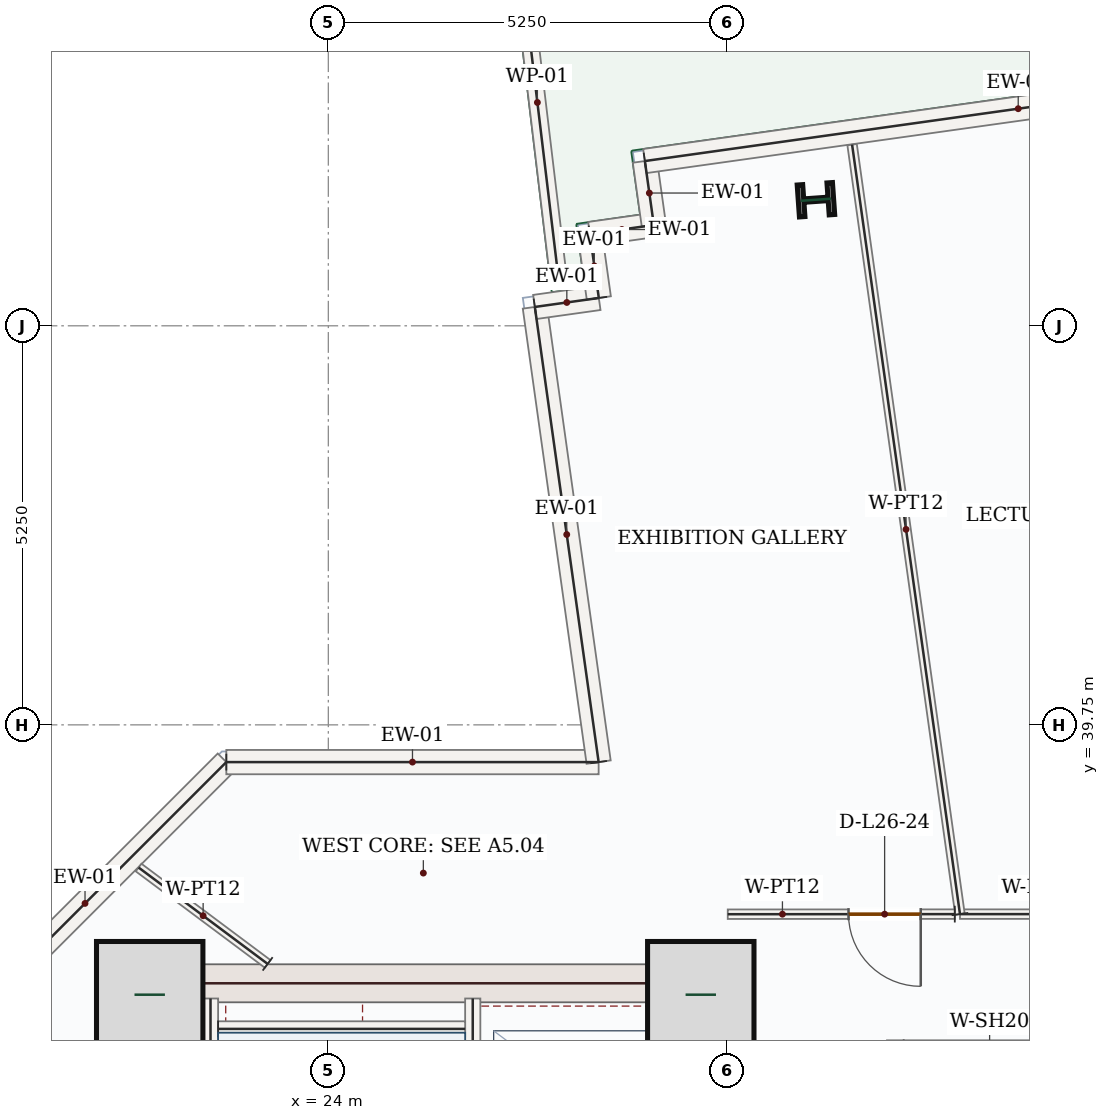
"""IFC4 building model, lengths in metres.
Left out: names, types, materials, properties, quantities, classifications, styles, units other than length and angle.
Written with IfcOpenShell. Run it as: python <this file> out.ifc"""

import sys

from ifc_helpers import new_model, si_unit, direction, frame, frame_2d, origin, origin_2d, place, context, subcontext, project, spatial, rectangle, i_section, extrude, source, transform, mapped, element, fill, save


model = new_model("IFC4")
c1 = context("Model", 3, precision=1e-05, world=origin(), true_north=direction((0.0, 1.0)))
c2 = subcontext(c1, "Body", "Model", "MODEL_VIEW")
j1 = project(units=[si_unit("LENGTHUNIT", "METRE"), si_unit("PLANEANGLEUNIT", "RADIAN")], contexts=[c1])
p1 = place(None, origin())
s1 = spatial("IfcSite", under=j1, at=p1, CompositionType="ELEMENT")
p2 = place(p1, origin())
s2 = spatial("IfcBuilding", under=s1, at=p2, CompositionType="ELEMENT")
p3 = place(p2, frame((0.0, 0.0, 117.3)))
s3 = spatial("IfcBuildingStorey", under=s2, at=p3, CompositionType="ELEMENT", Elevation=117.3)
m1 = source(origin(), c2, "Body", "SweptSolid", [
    extrude(rectangle(XDim=8.55, YDim=0.5, at=frame_2d((4.275, 0.0))), origin(), (0.0, 0.0, 1.0), 3.95),
])
p4 = place(p3, frame((21.5, 28.05, 0.0), z_axis=(0.0, 0.0, 1.0), x_axis=(0.0, 1.0, 0.0)))
e1 = element("IfcWall", 1, at=p4, inside=s3, PredefinedType="SHEAR", context=c2, shape_type="MappedRepresentation", body=[
    mapped(m1, transform((0.0, 0.0, 0.0), x_axis=(1.0, 0.0, 0.0), y_axis=(0.0, 1.0, 0.0), z_axis=(0.0, 0.0, 1.0), scale=1.0)),
])
p5 = place(p3, frame((29.0, 28.05, 0.0), z_axis=(0.0, 0.0, 1.0), x_axis=(0.0, 1.0, 0.0)))
e2 = element("IfcWall", 2, at=p5, inside=s3, PredefinedType="SHEAR", context=c2, shape_type="SweptSolid", body=[
    extrude(rectangle(XDim=8.55, YDim=0.5, at=frame_2d((4.275, 0.0))), origin(), (0.0, 0.0, 1.0), 3.95),
])
p6 = place(p5, frame((1.5, 0.0, 0.0)))
e3 = element("IfcOpeningElement", 3, at=p6, cuts=e2, PredefinedType="OPENING", context=c2, shape_type="SweptSolid", body=[
    extrude(rectangle(XDim=1.1, YDim=2.2, at=frame_2d((0.55, 1.1))), frame((0.0, 0.26, 0.0), z_axis=(0.0, -1.0, 0.0), x_axis=(1.0, 0.0, 0.0)), (0.0, 0.0, 1.0), 0.52),
])
m2 = source(origin(), c2, "Body", "SweptSolid", [
    extrude(rectangle(XDim=7.0, YDim=0.5, at=frame_2d((3.5, 0.0))), origin(), (0.0, 0.0, 1.0), 3.95),
])
p7 = place(p3, frame((21.75, 36.35, 0.0), z_axis=(0.0, 0.0, 1.0), x_axis=(1.0, 0.0, 0.0)))
e4 = element("IfcWall", 4, at=p7, inside=s3, PredefinedType="SHEAR", context=c2, shape_type="MappedRepresentation", body=[
    mapped(m2, transform((0.0, 0.0, 0.0), x_axis=(1.0, 0.0, 0.0), y_axis=(0.0, 1.0, 0.0), z_axis=(0.0, 0.0, 1.0), scale=1.0)),
])
m3 = source(origin(), c2, "Body", "SweptSolid", [
    extrude(rectangle(XDim=1.4, YDim=1.4, at=origin_2d()), origin(), (0.0, 0.0, 1.0), 4.2),
])
for number, where, z_axis, x_axis in (
    (5, (21.65, 36.2, 0.0), (0.0, 0.0, 1.0), (1.0, 0.0, 0.0)),
    (6, (28.9, 36.2, 0.0), (0.0, 0.0, 1.0), (1.0, 0.0, 0.0)),
):
    element("IfcColumn", number, at=place(p3, frame(where, z_axis=z_axis, x_axis=x_axis)), inside=s3, PredefinedType="COLUMN", context=c2, shape_type="MappedRepresentation", body=[
        mapped(m3, transform((0.0, 0.0, 0.0), x_axis=(1.0, 0.0, 0.0), y_axis=(0.0, 1.0, 0.0), z_axis=(0.0, 0.0, 1.0), scale=1.0)),
    ])
m4 = source(origin(), c2, "Body", "SweptSolid", [
    extrude(i_section(OverallWidth=0.421, OverallDepth=0.465, WebThickness=0.045, FlangeThickness=0.073, FilletRadius=0.018, at=origin_2d()), origin(), (0.0, 0.0, 1.0), 4.2),
])
p8 = place(p3, frame((30.415, 46.658, 0.0), z_axis=(0.0, 0.0, 1.0), x_axis=(-0.069756473744, 0.99756405026, 0.0)))
e7 = element("IfcColumn", 7, at=p8, inside=s3, PredefinedType="COLUMN", context=c2, shape_type="MappedRepresentation", body=[
    mapped(m4, transform((0.0, 0.0, 0.0), x_axis=(1.0, 0.0, 0.0), y_axis=(0.0, 1.0, 0.0), z_axis=(0.0, 0.0, 1.0), scale=1.0)),
])
m5 = source(origin(), c2, "Body", "SweptSolid", [
    extrude(rectangle(XDim=4.599, YDim=0.22, at=frame_2d((2.3, 0.0))), origin(), (0.0, 0.0, 1.0), 1.2),
])
p9 = place(p3, frame((27.024, 45.655, 0.0), z_axis=(0.0, 0.0, 1.0), x_axis=(-0.119113824052, 0.992880605571, 0.0)))
e8 = element("IfcWall", 8, at=p9, inside=s3, PredefinedType="PARAPET", context=c2, shape_type="MappedRepresentation", body=[
    mapped(m5, transform((0.0, 0.0, 0.0), x_axis=(1.0, 0.0, 0.0), y_axis=(0.0, 1.0, 0.0), z_axis=(0.0, 0.0, 1.0), scale=1.0)),
])
m6 = source(origin(), c2, "Body", "SweptSolid", [
    extrude(rectangle(XDim=5.258, YDim=0.32, at=frame_2d((2.629, 0.0))), origin(), (0.0, 0.0, 1.0), 3.95),
])
p10 = place(p3, frame((18.94, 35.542, 0.0), z_axis=(0.0, 0.0, 1.0), x_axis=(0.707106781187, 0.707106781187, 0.0)))
e9 = element("IfcWall", 9, at=p10, inside=s3, PredefinedType="SOLIDWALL", context=c2, shape_type="MappedRepresentation", body=[
    mapped(m6, transform((0.0, 0.0, 0.0), x_axis=(1.0, 0.0, 0.0), y_axis=(0.0, 1.0, 0.0), z_axis=(0.0, 0.0, 1.0), scale=1.0)),
])
m7 = source(origin(), c2, "Body", "SweptSolid", [
    extrude(rectangle(XDim=4.898, YDim=0.32, at=frame_2d((2.449, 0.0))), origin(), (0.0, 0.0, 1.0), 3.95),
])
p11 = place(p3, frame((22.658, 39.26, 0.0), z_axis=(0.0, 0.0, 1.0), x_axis=(1.0, 0.0, 0.0)))
e10 = element("IfcWall", 10, at=p11, inside=s3, PredefinedType="SOLIDWALL", context=c2, shape_type="MappedRepresentation", body=[
    mapped(m7, transform((0.0, 0.0, 0.0), x_axis=(1.0, 0.0, 0.0), y_axis=(0.0, 1.0, 0.0), z_axis=(0.0, 0.0, 1.0), scale=1.0)),
])
m8 = source(origin(), c2, "Body", "SweptSolid", [
    extrude(rectangle(XDim=6.046, YDim=0.32, at=frame_2d((3.023, 0.0))), origin(), (0.0, 0.0, 1.0), 3.95),
])
p12 = place(p3, frame((27.556, 39.26, 0.0), z_axis=(0.0, 0.0, 1.0), x_axis=(-0.138820507469, 0.990317558517, 0.0)))
e11 = element("IfcWall", 11, at=p12, inside=s3, PredefinedType="SOLIDWALL", context=c2, shape_type="MappedRepresentation", body=[
    mapped(m8, transform((0.0, 0.0, 0.0), x_axis=(1.0, 0.0, 0.0), y_axis=(0.0, 1.0, 0.0), z_axis=(0.0, 0.0, 1.0), scale=1.0)),
])
m9 = source(origin(), c2, "Body", "SweptSolid", [
    extrude(rectangle(XDim=0.85, YDim=0.32, at=frame_2d((0.425, 0.0))), origin(), (0.0, 0.0, 1.0), 3.95),
])
for number, where, z_axis, x_axis in (
    (12, (26.717, 45.248, 0.0), (0.0, 0.0, 1.0), (0.99, 0.139, 0.0)),
    (13, (27.559, 45.366, 0.0), (0.0, 0.0, 1.0), (-0.139, 0.99, 0.0)),
):
    element("IfcWall", number, at=place(p3, frame(where, z_axis=z_axis, x_axis=x_axis)), inside=s3, PredefinedType="SOLIDWALL", context=c2, shape_type="MappedRepresentation", body=[
        mapped(m9, transform((0.0, 0.0, 0.0), x_axis=(1.0, 0.0, 0.0), y_axis=(0.0, 1.0, 0.0), z_axis=(0.0, 0.0, 1.0), scale=1.0)),
    ])
m10 = source(origin(), c2, "Body", "SweptSolid", [
    extrude(rectangle(XDim=0.85, YDim=0.32, at=frame_2d((0.425, 0.0))), origin(), (0.0, 0.0, 1.0), 3.95),
])
p13 = place(p3, frame((27.441, 46.208, 0.0), z_axis=(0.0, 0.0, 1.0), x_axis=(0.990325171071, 0.138766190202, 0.0)))
e14 = element("IfcWall", 14, at=p13, inside=s3, PredefinedType="SOLIDWALL", context=c2, shape_type="MappedRepresentation", body=[
    mapped(m10, transform((0.0, 0.0, 0.0), x_axis=(1.0, 0.0, 0.0), y_axis=(0.0, 1.0, 0.0), z_axis=(0.0, 0.0, 1.0), scale=1.0)),
])
p14 = place(p3, frame((28.282, 46.326, 0.0), z_axis=(0.0, 0.0, 1.0), x_axis=(-0.138726719425, 0.990330700987, 0.0)))
e15 = element("IfcWall", 15, at=p14, inside=s3, PredefinedType="SOLIDWALL", context=c2, shape_type="MappedRepresentation", body=[
    mapped(m9, transform((0.0, 0.0, 0.0), x_axis=(1.0, 0.0, 0.0), y_axis=(0.0, 1.0, 0.0), z_axis=(0.0, 0.0, 1.0), scale=1.0)),
])
m11 = source(origin(), c2, "Body", "SweptSolid", [
    extrude(rectangle(XDim=9.92, YDim=0.32, at=frame_2d((4.96, 0.0))), origin(), (0.0, 0.0, 1.0), 3.95),
])
p15 = place(p3, frame((28.164, 47.167, 0.0), z_axis=(0.0, 0.0, 1.0), x_axis=(0.990316250135, 0.138829840876, 0.0)))
e16 = element("IfcWall", 16, at=p15, inside=s3, PredefinedType="SOLIDWALL", context=c2, shape_type="MappedRepresentation", body=[
    mapped(m11, transform((0.0, 0.0, 0.0), x_axis=(1.0, 0.0, 0.0), y_axis=(0.0, 1.0, 0.0), z_axis=(0.0, 0.0, 1.0), scale=1.0)),
])
m12 = source(origin(), c2, "Body", "SweptSolid", [
    extrude(rectangle(XDim=7.87, YDim=0.2, at=frame_2d((3.935, 0.0))), origin(), (0.0, 0.0, 1.0), 3.95),
])
p16 = place(p3, frame((22.45, 28.28, 0.0), z_axis=(0.0, 0.0, 1.0), x_axis=(0.0, 1.0, 0.0)))
e17 = element("IfcWall", 17, at=p16, inside=s3, PredefinedType="SOLIDWALL", context=c2, shape_type="MappedRepresentation", body=[
    mapped(m12, transform((0.0, 0.0, 0.0), x_axis=(1.0, 0.0, 0.0), y_axis=(0.0, 1.0, 0.0), z_axis=(0.0, 0.0, 1.0), scale=1.0)),
])
p17 = place(p3, frame((25.9, 28.15, 0.0), z_axis=(0.0, 0.0, 1.0), x_axis=(0.0, 1.0, 0.0)))
e18 = element("IfcWall", 18, at=p17, inside=s3, PredefinedType="SOLIDWALL", context=c2, shape_type="SweptSolid", body=[
    extrude(rectangle(XDim=8.0, YDim=0.2, at=frame_2d((4.0, 0.0))), origin(), (0.0, 0.0, 1.0), 3.95),
])
p18 = place(p17, frame((0.4, 0.0, 0.0)))
e19 = element("IfcOpeningElement", 19, at=p18, cuts=e18, PredefinedType="OPENING", context=c2, shape_type="SweptSolid", body=[
    extrude(rectangle(XDim=1.05, YDim=2.15, at=frame_2d((0.525, 1.075))), frame((0.0, 0.11, 0.0), z_axis=(0.0, -1.0, 0.0), x_axis=(1.0, 0.0, 0.0)), (0.0, 0.0, 1.0), 0.22),
])
m13 = source(origin(), c2, "Body", "SweptSolid", [
    extrude(rectangle(XDim=3.25, YDim=0.2, at=frame_2d((1.625, 0.0))), origin(), (0.0, 0.0, 1.0), 3.95),
])
p19 = place(p3, frame((22.55, 35.75, 0.0), z_axis=(0.0, 0.0, 1.0), x_axis=(1.0, 0.0, 0.0)))
e20 = element("IfcWall", 20, at=p19, inside=s3, PredefinedType="SOLIDWALL", context=c2, shape_type="MappedRepresentation", body=[
    mapped(m13, transform((0.0, 0.0, 0.0), x_axis=(1.0, 0.0, 0.0), y_axis=(0.0, 1.0, 0.0), z_axis=(0.0, 0.0, 1.0), scale=1.0)),
])
m14 = source(origin(), c2, "Body", "SweptSolid", [
    extrude(rectangle(XDim=2.4, YDim=0.2, at=frame_2d((1.2, 0.0))), origin(), (0.0, 0.0, 1.0), 3.95),
])
p20 = place(p3, frame((31.45, 33.2, 0.0), z_axis=(0.0, 0.0, 1.0), x_axis=(0.0, 1.0, 0.0)))
e21 = element("IfcWall", 21, at=p20, inside=s3, PredefinedType="SOLIDWALL", context=c2, shape_type="MappedRepresentation", body=[
    mapped(m14, transform((0.0, 0.0, 0.0), x_axis=(1.0, 0.0, 0.0), y_axis=(0.0, 1.0, 0.0), z_axis=(0.0, 0.0, 1.0), scale=1.0)),
])
p21 = place(p3, frame((36.119, 37.26, 0.0), z_axis=(0.0, 0.0, 1.0), x_axis=(-1.0, 0.0, 0.0)))
e22 = element("IfcWall", 22, at=p21, inside=s3, PredefinedType="PARTITIONING", context=c2, shape_type="SweptSolid", body=[
    extrude(rectangle(XDim=3.809, YDim=0.125, at=frame_2d((1.905, 0.0))), origin(), (0.0, 0.0, 1.0), 3.95),
])
p22 = place(p21, frame((0.629, 0.0, 0.0)))
e23 = element("IfcOpeningElement", 23, at=p22, cuts=e22, PredefinedType="OPENING", context=c2, shape_type="SweptSolid", body=[
    extrude(rectangle(XDim=0.95, YDim=2.15, at=frame_2d((0.475, 1.075))), frame((0.0, 0.073, 0.0), z_axis=(0.0, -1.0, 0.0), x_axis=(1.0, 0.0, 0.0)), (0.0, 0.0, 1.0), 0.145),
])
m15 = source(origin(), c2, "Body", "SweptSolid", [
    extrude(rectangle(XDim=10.222, YDim=0.125, at=frame_2d((5.111, 0.0))), origin(), (0.0, 0.0, 1.0), 3.95),
])
p23 = place(p3, frame((32.31, 37.26, 0.0), z_axis=(0.0, 0.0, 1.0), x_axis=(-0.138816035819, 0.990318185332, 0.0)))
e24 = element("IfcWall", 24, at=p23, inside=s3, PredefinedType="PARTITIONING", context=c2, shape_type="MappedRepresentation", body=[
    mapped(m15, transform((0.0, 0.0, 0.0), x_axis=(1.0, 0.0, 0.0), y_axis=(0.0, 1.0, 0.0), z_axis=(0.0, 0.0, 1.0), scale=1.0)),
])
p24 = place(p3, frame((32.242, 37.26, 0.0), z_axis=(0.0, 0.0, 1.0), x_axis=(-0.999999916483, -0.00040869704, 0.0)))
e25 = element("IfcWall", 25, at=p24, inside=s3, PredefinedType="PARTITIONING", context=c2, shape_type="SweptSolid", body=[
    extrude(rectangle(XDim=2.987, YDim=0.125, at=frame_2d((1.493, 0.0))), origin(), (0.0, 0.0, 1.0), 3.95),
])
p25 = place(p24, frame((0.448, 0.0, 0.0)))
e26 = element("IfcOpeningElement", 26, at=p25, cuts=e25, PredefinedType="OPENING", context=c2, shape_type="SweptSolid", body=[
    extrude(rectangle(XDim=0.95, YDim=2.15, at=frame_2d((0.475, 1.075))), frame((0.0, 0.073, 0.0), z_axis=(0.0, -1.0, 0.0), x_axis=(1.0, 0.0, 0.0)), (0.0, 0.0, 1.0), 0.145),
])
m16 = source(origin(), c2, "Body", "SweptSolid", [
    extrude(rectangle(XDim=2.119, YDim=0.125, at=frame_2d((1.059, 0.0))), origin(), (0.0, 0.0, 1.0), 3.95),
])
p26 = place(p3, frame((23.202, 36.605, 0.0), z_axis=(0.0, 0.0, 1.0), x_axis=(-0.801201403988, 0.598394777925, 0.0)))
e27 = element("IfcWall", 27, at=p26, inside=s3, PredefinedType="PARTITIONING", context=c2, shape_type="MappedRepresentation", body=[
    mapped(m16, transform((0.0, 0.0, 0.0), x_axis=(1.0, 0.0, 0.0), y_axis=(0.0, 1.0, 0.0), z_axis=(0.0, 0.0, 1.0), scale=1.0)),
])
m17 = source(origin(), c2, "Body", "SweptSolid", [
    extrude(rectangle(XDim=0.95, YDim=2.15, at=frame_2d((0.475, 1.075))), frame((0.0, 0.025, 0.0), z_axis=(0.0, -1.0, 0.0), x_axis=(1.0, 0.0, 0.0)), (0.0, 0.0, 1.0), 0.05),
])
p27 = place(p25, origin())
e28 = element("IfcDoor", 28, at=p27, inside=s3, OperationType="SINGLE_SWING_LEFT", PredefinedType="DOOR", context=c2, shape_type="MappedRepresentation", body=[
    mapped(m17, transform((0.0, 0.0, 0.0), x_axis=(1.0, 0.0, 0.0), y_axis=(0.0, 1.0, 0.0), z_axis=(0.0, 0.0, 1.0), scale=1.0)),
])
fill(e26, e28)
save(model, sys.argv[1])
